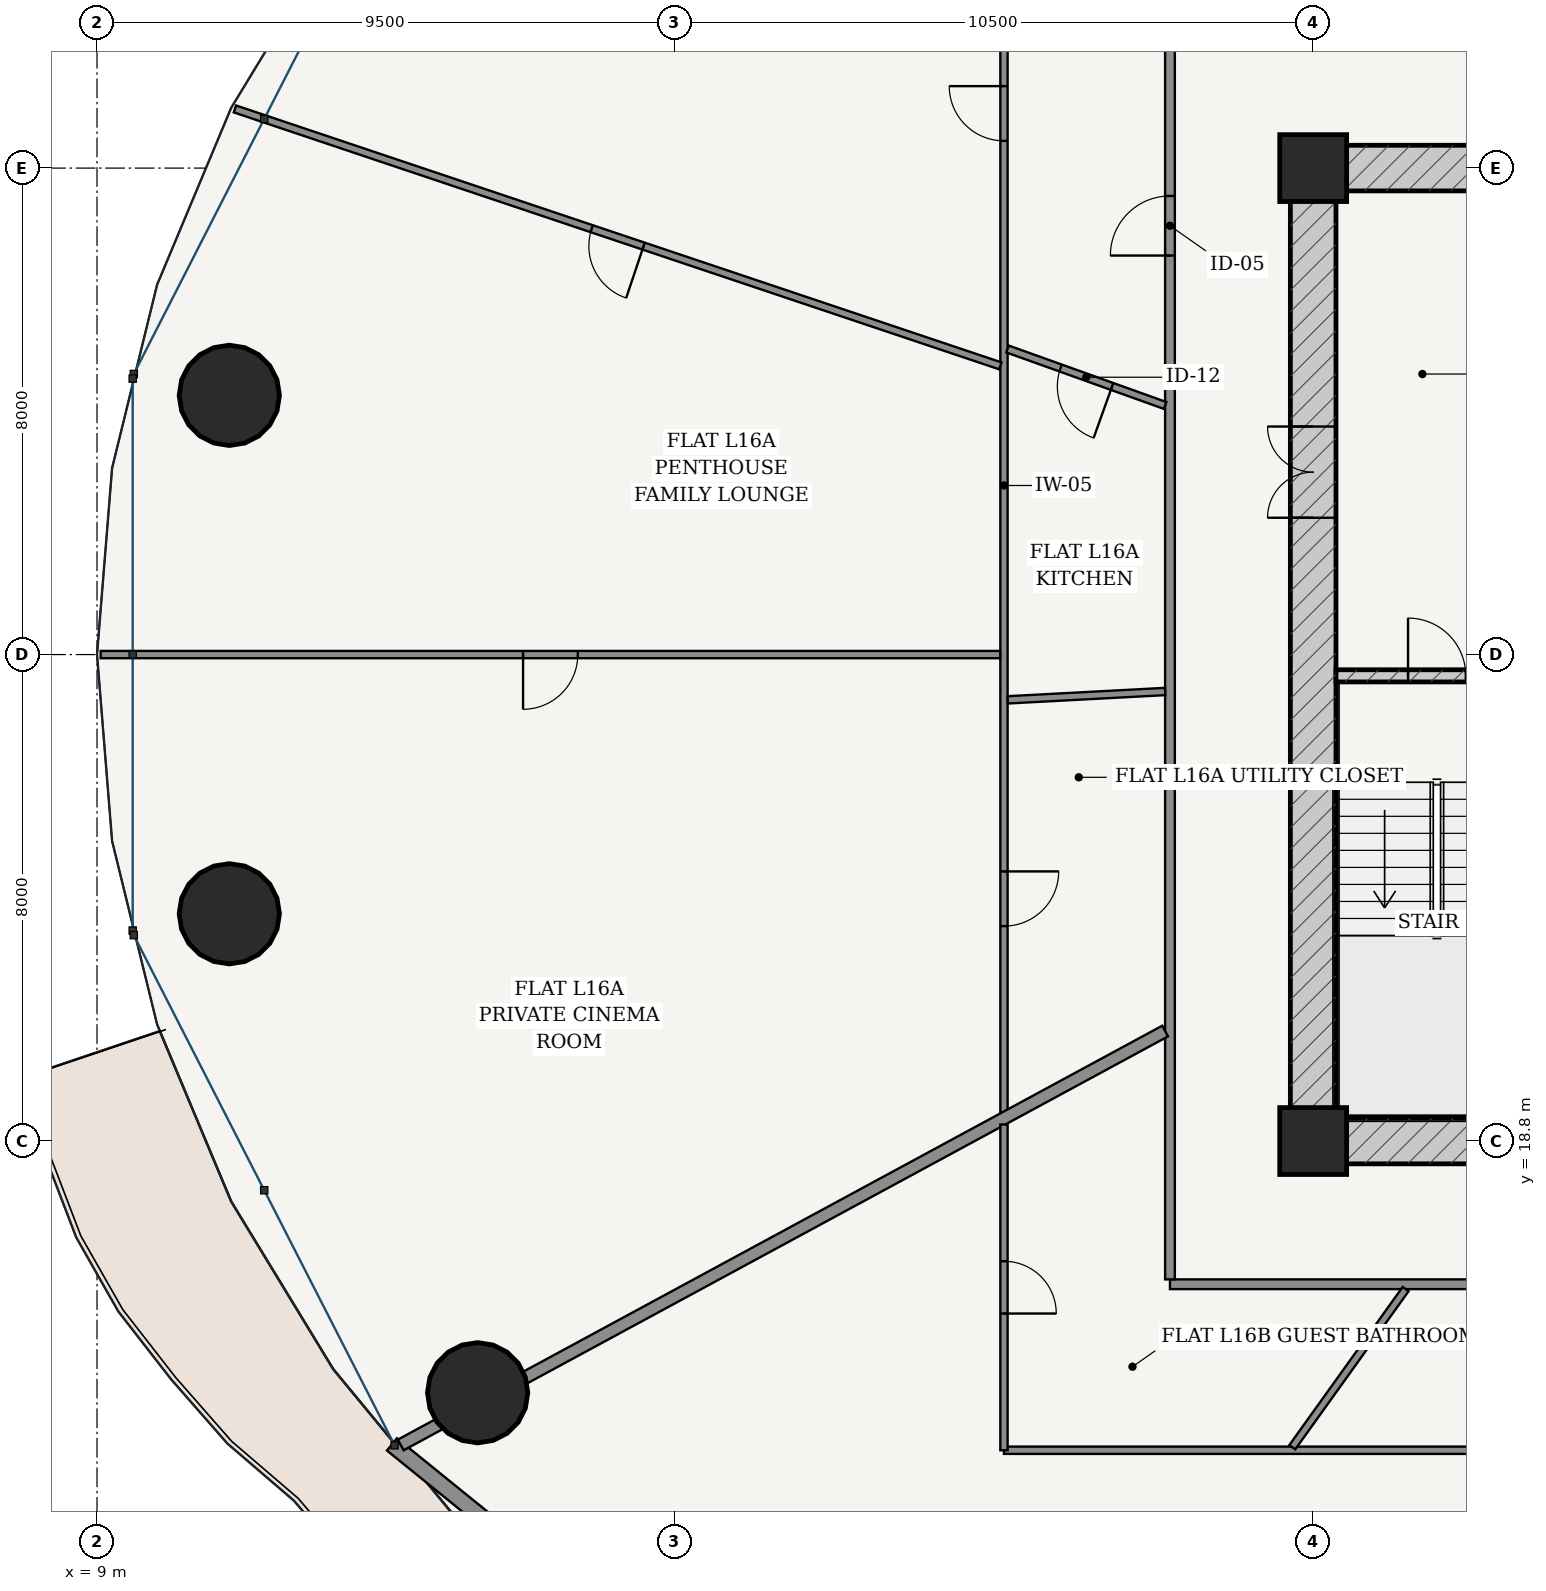
"""IFC4 building model, lengths in metres.
Left out: names, types, materials, properties, quantities, classifications, styles, units other than length and angle.
Written with IfcOpenShell. Run it as: python <this file> out.ifc"""

import sys

from ifc_helpers import new_model, si_unit, direction, frame, frame_2d, origin, origin_2d, place, context, subcontext, project, spatial, rectangle, hollow_circle, extrude, source, transform, mapped, element, fill, save


model = new_model("IFC4")
c1 = context("Model", 3, precision=1e-05, world=origin(), true_north=direction((-0.2419218956, 0.970295726276)))
c2 = subcontext(c1, "Body", "Model", "MODEL_VIEW")
j1 = project(units=[si_unit("LENGTHUNIT", "METRE"), si_unit("PLANEANGLEUNIT", "RADIAN")], contexts=[c1])
p1 = place(None, origin())
s1 = spatial("IfcSite", under=j1, at=p1, CompositionType="ELEMENT")
p2 = place(p1, origin())
s2 = spatial("IfcBuilding", under=s1, at=p2, CompositionType="ELEMENT")
p3 = place(p2, frame((0.0, 0.0, 63.6)))
s3 = spatial("IfcBuildingStorey", under=s2, at=p3, CompositionType="ELEMENT", Elevation=63.6)
for number, where, z_axis, x_axis in (
    (1, (29.0, 18.8, 0.0), (0.0, 0.0, 1.0), (1.0, 0.0, 0.0)),
    (2, (29.0, 34.8, 0.0), (0.0, 0.0, 1.0), (1.0, 0.0, 0.0)),
):
    element("IfcColumn", number, at=place(p3, frame(where, z_axis=z_axis, x_axis=x_axis)), inside=s3, PredefinedType="COLUMN", context=c2, shape_type="SweptSolid", body=[
        extrude(rectangle(XDim=1.1, YDim=1.1, at=origin_2d()), origin(), (0.0, 0.0, 1.0), 3.6),
    ])
p4 = place(p3, frame((28.625, 18.8, 0.0), z_axis=(0.0, 0.0, 1.0), x_axis=(1.0, 0.0, 0.0)))
e3 = element("IfcWall", 3, at=p4, inside=s3, PredefinedType="SHEAR", context=c2, shape_type="SweptSolid", body=[
    extrude(rectangle(XDim=18.75, YDim=0.75, at=frame_2d((9.375, 0.0))), origin(), (0.0, 0.0, 1.0), 3.32),
])
p5 = place(p4, frame((8.95, 0.0, 0.0)))
e4 = element("IfcOpeningElement", 4, at=p5, cuts=e3, PredefinedType="OPENING", context=c2, shape_type="SweptSolid", body=[
    extrude(rectangle(XDim=0.85, YDim=2.1, at=frame_2d((0.425, 1.05))), frame((0.0, 0.385, 0.0), z_axis=(0.0, -1.0, 0.0), x_axis=(1.0, 0.0, 0.0)), (0.0, 0.0, 1.0), 0.77),
])
p6 = place(p3, frame((28.625, 34.8, 0.0), z_axis=(0.0, 0.0, 1.0), x_axis=(1.0, 0.0, 0.0)))
e5 = element("IfcWall", 5, at=p6, inside=s3, PredefinedType="SHEAR", context=c2, shape_type="SweptSolid", body=[
    extrude(rectangle(XDim=18.75, YDim=0.75, at=frame_2d((9.375, 0.0))), origin(), (0.0, 0.0, 1.0), 3.32),
])
p7 = place(p6, frame((8.95, 0.0, 0.0)))
e6 = element("IfcOpeningElement", 6, at=p7, cuts=e5, PredefinedType="OPENING", context=c2, shape_type="SweptSolid", body=[
    extrude(rectangle(XDim=0.85, YDim=2.1, at=frame_2d((0.425, 1.05))), frame((0.0, 0.385, 0.0), z_axis=(0.0, -1.0, 0.0), x_axis=(1.0, 0.0, 0.0)), (0.0, 0.0, 1.0), 0.77),
])
p8 = place(p3, frame((29.0, 19.175, 0.0), z_axis=(0.0, 0.0, 1.0), x_axis=(0.0, 1.0, 0.0)))
e7 = element("IfcWall", 7, at=p8, inside=s3, PredefinedType="SHEAR", context=c2, shape_type="SweptSolid", body=[
    extrude(rectangle(XDim=15.25, YDim=0.75, at=frame_2d((7.625, 0.0))), origin(), (0.0, 0.0, 1.0), 3.32),
])
p9 = place(p8, frame((9.875, 0.0, 0.0)))
e8 = element("IfcOpeningElement", 8, at=p9, cuts=e7, PredefinedType="OPENING", context=c2, shape_type="SweptSolid", body=[
    extrude(rectangle(XDim=1.5, YDim=2.2, at=frame_2d((0.75, 1.1))), frame((0.0, 0.385, 0.0), z_axis=(0.0, -1.0, 0.0), x_axis=(1.0, 0.0, 0.0)), (0.0, 0.0, 1.0), 0.77),
])
p10 = place(p3, frame((29.375, 26.45, 0.0), z_axis=(0.0, 0.0, 1.0), x_axis=(1.0, 0.0, 0.0)))
e9 = element("IfcWall", 9, at=p10, inside=s3, PredefinedType="SOLIDWALL", context=c2, shape_type="SweptSolid", body=[
    extrude(rectangle(XDim=3.32, YDim=0.2, at=frame_2d((1.66, 0.0))), origin(), (0.0, 0.0, 1.0), 3.32),
])
p11 = place(p10, frame((1.185, 0.0, 0.0)))
e10 = element("IfcOpeningElement", 10, at=p11, cuts=e9, PredefinedType="OPENING", context=c2, shape_type="SweptSolid", body=[
    extrude(rectangle(XDim=0.95, YDim=2.15, at=frame_2d((0.475, 1.075))), frame((0.0, 0.11, 0.0), z_axis=(0.0, -1.0, 0.0), x_axis=(1.0, 0.0, 0.0)), (0.0, 0.0, 1.0), 0.22),
])
for number, where, z_axis, x_axis in (
    (11, (11.176, 31.063, 0.0), (0.0, 0.0, 1.0), (1.0, 0.0, 0.0)),
    (12, (11.176, 22.537, 0.0), (0.0, 0.0, 1.0), (1.0, 0.0, 0.0)),
    (13, (15.259, 14.661, 0.0), (0.0, 0.0, 1.0), (1.0, 0.0, 0.0)),
):
    element("IfcColumn", number, at=place(p3, frame(where, z_axis=z_axis, x_axis=x_axis)), inside=s3, PredefinedType="COLUMN", context=c2, shape_type="SweptSolid", body=[
        extrude(hollow_circle(Radius=0.825, WallThickness=0.05, at=origin_2d()), origin(), (0.0, 0.0, 1.0), 3.6),
    ])
p12 = place(p3, frame((13.85, 13.811, 0.0), z_axis=(0.0, 0.0, 1.0), x_axis=(0.777016782851, -0.629479879875, 0.0)))
e14 = element("IfcWall", 14, at=p12, inside=s3, PredefinedType="SOLIDWALL", context=c2, shape_type="SweptSolid", body=[
    extrude(rectangle(XDim=10.447, YDim=0.26, at=frame_2d((5.223, 0.0))), origin(), (0.0, 0.0, 1.0), 3.32),
])
p13 = place(p12, frame((4.548, 0.0, 0.0)))
e15 = element("IfcOpeningElement", 15, at=p13, cuts=e14, PredefinedType="OPENING", context=c2, shape_type="SweptSolid", body=[
    extrude(rectangle(XDim=1.35, YDim=2.2, at=frame_2d((0.675, 1.1))), frame((0.0, 0.14, 0.0), z_axis=(0.0, -1.0, 0.0), x_axis=(1.0, 0.0, 0.0)), (0.0, 0.0, 1.0), 0.28),
])
p14 = place(p3, frame((26.645, 16.445, 0.0), z_axis=(0.0, 0.0, 1.0), x_axis=(1.0, 0.0, 0.0)))
e16 = element("IfcWall", 16, at=p14, inside=s3, PredefinedType="PARTITIONING", context=c2, shape_type="SweptSolid", body=[
    extrude(rectangle(XDim=22.71, YDim=0.16, at=frame_2d((11.355, 0.0))), origin(), (0.0, 0.0, 1.0), 2.688),
])
p15 = place(p3, frame((26.645, 16.525, 0.0), z_axis=(0.0, 0.0, 1.0), x_axis=(0.0, 1.0, 0.0)))
e17 = element("IfcWall", 17, at=p15, inside=s3, PredefinedType="PARTITIONING", context=c2, shape_type="SweptSolid", body=[
    extrude(rectangle(XDim=20.55, YDim=0.16, at=frame_2d((10.275, 0.0))), origin(), (0.0, 0.0, 1.0), 2.688),
])
p16 = place(p15, frame((16.837, 0.0, 0.0)))
e18 = element("IfcOpeningElement", 18, at=p16, cuts=e17, PredefinedType="OPENING", context=c2, shape_type="SweptSolid", body=[
    extrude(rectangle(XDim=0.98, YDim=2.2, at=frame_2d((0.49, 1.1))), frame((0.0, 0.09, 0.0), z_axis=(0.0, -1.0, 0.0), x_axis=(1.0, 0.0, 0.0)), (0.0, 0.0, 1.0), 0.18),
])
p17 = place(p3, frame((23.915, 19.276, 0.0), z_axis=(0.0, 0.0, 1.0), x_axis=(0.0, 1.0, 0.0)))
e19 = element("IfcWall", 19, at=p17, inside=s3, PredefinedType="PARTITIONING", context=c2, shape_type="SweptSolid", body=[
    extrude(rectangle(XDim=20.609, YDim=0.12, at=frame_2d((10.305, 0.0))), origin(), (0.0, 0.0, 1.0), 2.688),
])
p18 = place(p17, frame((15.972, 0.0, 0.0)))
e20 = element("IfcOpeningElement", 20, at=p18, cuts=e19, PredefinedType="OPENING", context=c2, shape_type="SweptSolid", body=[
    extrude(rectangle(XDim=0.9, YDim=2.15, at=frame_2d((0.45, 1.075))), frame((0.0, 0.07, 0.0), z_axis=(0.0, -1.0, 0.0), x_axis=(1.0, 0.0, 0.0)), (0.0, 0.0, 1.0), 0.14),
])
p19 = place(p17, frame((3.058, 0.0, 0.0)))
e21 = element("IfcOpeningElement", 21, at=p19, cuts=e19, PredefinedType="OPENING", context=c2, shape_type="SweptSolid", body=[
    extrude(rectangle(XDim=0.9, YDim=2.15, at=frame_2d((0.45, 1.075))), frame((0.0, 0.07, 0.0), z_axis=(0.0, -1.0, 0.0), x_axis=(1.0, 0.0, 0.0)), (0.0, 0.0, 1.0), 0.14),
])
p20 = place(p3, frame((23.856, 31.547, 0.0), z_axis=(0.0, 0.0, 1.0), x_axis=(-0.948017487737, 0.318218231634, 0.0)))
e22 = element("IfcWall", 22, at=p20, inside=s3, PredefinedType="PARTITIONING", context=c2, shape_type="SweptSolid", body=[
    extrude(rectangle(XDim=13.279, YDim=0.12, at=frame_2d((6.639, 0.0))), origin(), (0.0, 0.0, 1.0), 2.762),
])
p21 = place(p20, frame((6.189, 0.0, 0.0)))
e23 = element("IfcOpeningElement", 23, at=p21, cuts=e22, PredefinedType="OPENING", context=c2, shape_type="SweptSolid", body=[
    extrude(rectangle(XDim=0.9, YDim=2.15, at=frame_2d((0.45, 1.075))), frame((0.0, 0.07, 0.0), z_axis=(0.0, -1.0, 0.0), x_axis=(1.0, 0.0, 0.0)), (0.0, 0.0, 1.0), 0.14),
])
p22 = place(p3, frame((23.853, 26.8, 0.0), z_axis=(0.0, 0.0, 1.0), x_axis=(-1.0, 0.0, 0.0)))
e24 = element("IfcWall", 24, at=p22, inside=s3, PredefinedType="PARTITIONING", context=c2, shape_type="SweptSolid", body=[
    extrude(rectangle(XDim=14.793, YDim=0.12, at=frame_2d((7.396, 0.0))), origin(), (0.0, 0.0, 1.0), 2.762),
])
p23 = place(p22, frame((6.947, 0.0, 0.0)))
e25 = element("IfcOpeningElement", 25, at=p23, cuts=e24, PredefinedType="OPENING", context=c2, shape_type="SweptSolid", body=[
    extrude(rectangle(XDim=0.9, YDim=2.15, at=frame_2d((0.45, 1.075))), frame((0.0, 0.07, 0.0), z_axis=(0.0, -1.0, 0.0), x_axis=(1.0, 0.0, 0.0)), (0.0, 0.0, 1.0), 0.14),
])
p24 = place(p3, frame((26.565, 30.896, 0.0), z_axis=(0.0, 0.0, 1.0), x_axis=(-0.941406362049, 0.337274460186, 0.0)))
e26 = element("IfcWall", 26, at=p24, inside=s3, PredefinedType="PARTITIONING", context=c2, shape_type="SweptSolid", body=[
    extrude(rectangle(XDim=2.753, YDim=0.12, at=frame_2d((1.376, 0.0))), origin(), (0.0, 0.0, 1.0), 3.32),
])
p25 = place(p24, frame((0.927, 0.0, 0.0)))
e27 = element("IfcOpeningElement", 27, at=p25, cuts=e26, PredefinedType="OPENING", context=c2, shape_type="SweptSolid", body=[
    extrude(rectangle(XDim=0.9, YDim=2.15, at=frame_2d((0.45, 1.075))), frame((0.0, 0.07, 0.0), z_axis=(0.0, -1.0, 0.0), x_axis=(1.0, 0.0, 0.0)), (0.0, 0.0, 1.0), 0.14),
])
p26 = place(p3, frame((26.565, 26.193, 0.0), z_axis=(0.0, 0.0, 1.0), x_axis=(-0.99859273586, -0.053033460078, 0.0)))
e28 = element("IfcWall", 28, at=p26, inside=s3, PredefinedType="PARTITIONING", context=c2, shape_type="SweptSolid", body=[
    extrude(rectangle(XDim=2.592, YDim=0.12, at=frame_2d((1.296, 0.0))), origin(), (0.0, 0.0, 1.0), 3.32),
])
p27 = place(p3, frame((26.565, 20.608, 0.0), z_axis=(0.0, 0.0, 1.0), x_axis=(-0.879369737803, -0.476139542819, 0.0)))
e29 = element("IfcWall", 29, at=p27, inside=s3, PredefinedType="PARTITIONING", context=c2, shape_type="SweptSolid", body=[
    extrude(rectangle(XDim=14.295, YDim=0.2, at=frame_2d((7.147, 0.0))), origin(), (0.0, 0.0, 1.0), 2.688),
])
p28 = place(p3, frame((52.085, 13.715, 0.0), z_axis=(0.0, 0.0, 1.0), x_axis=(-1.0, 0.0, 0.0)))
e30 = element("IfcWall", 30, at=p28, inside=s3, PredefinedType="PARTITIONING", context=c2, shape_type="SweptSolid", body=[
    extrude(rectangle(XDim=28.17, YDim=0.12, at=frame_2d((14.085, 0.0))), origin(), (0.0, 0.0, 1.0), 2.688),
])
p29 = place(p28, frame((12.891, 0.0, 0.0)))
e31 = element("IfcOpeningElement", 31, at=p29, cuts=e30, PredefinedType="OPENING", context=c2, shape_type="SweptSolid", body=[
    extrude(rectangle(XDim=0.9, YDim=2.15, at=frame_2d((0.45, 1.075))), frame((0.0, 0.07, 0.0), z_axis=(0.0, -1.0, 0.0), x_axis=(1.0, 0.0, 0.0)), (0.0, 0.0, 1.0), 0.14),
])
p30 = place(p3, frame((23.915, 13.715, 0.0), z_axis=(0.0, 0.0, 1.0), x_axis=(0.0, 1.0, 0.0)))
e32 = element("IfcWall", 32, at=p30, inside=s3, PredefinedType="PARTITIONING", context=c2, shape_type="SweptSolid", body=[
    extrude(rectangle(XDim=5.356, YDim=0.12, at=frame_2d((2.678, 0.0))), origin(), (0.0, 0.0, 1.0), 2.999),
])
p31 = place(p30, frame((2.248, 0.0, 0.0)))
e33 = element("IfcOpeningElement", 33, at=p31, cuts=e32, PredefinedType="OPENING", context=c2, shape_type="SweptSolid", body=[
    extrude(rectangle(XDim=0.86, YDim=2.15, at=frame_2d((0.43, 1.075))), frame((0.0, 0.07, 0.0), z_axis=(0.0, -1.0, 0.0), x_axis=(1.0, 0.0, 0.0)), (0.0, 0.0, 1.0), 0.14),
])
p32 = place(p3, frame((30.52, 16.365, 0.0), z_axis=(0.0, 0.0, 1.0), x_axis=(-0.582566008831, -0.812783393872, 0.0)))
e34 = element("IfcWall", 34, at=p32, inside=s3, PredefinedType="PARTITIONING", context=c2, shape_type="SweptSolid", body=[
    extrude(rectangle(XDim=3.198, YDim=0.12, at=frame_2d((1.599, 0.0))), origin(), (0.0, 0.0, 1.0), 3.32),
])
m1 = source(origin(), c2, "Body", "SweptSolid", [
    extrude(rectangle(XDim=1.5, YDim=2.2, at=frame_2d((0.75, 1.1))), frame((0.0, 0.025, 0.0), z_axis=(0.0, -1.0, 0.0), x_axis=(1.0, 0.0, 0.0)), (0.0, 0.0, 1.0), 0.05),
])
p33 = place(p9, origin())
e35 = element("IfcDoor", 35, at=p33, inside=s3, OperationType="DOUBLE_DOOR_SINGLE_SWING", PredefinedType="DOOR", context=c2, shape_type="MappedRepresentation", body=[
    mapped(m1, transform((0.0, 0.0, 0.0), scale=1.0)),
])
fill(e8, e35)
m2 = source(origin(), c2, "Body", "SweptSolid", [
    extrude(rectangle(XDim=0.95, YDim=2.15, at=frame_2d((0.475, 1.075))), frame((0.0, 0.025, 0.0), z_axis=(0.0, -1.0, 0.0), x_axis=(1.0, 0.0, 0.0)), (0.0, 0.0, 1.0), 0.05),
])
p34 = place(p11, origin())
e36 = element("IfcDoor", 36, at=p34, inside=s3, OperationType="SINGLE_SWING_LEFT", PredefinedType="DOOR", context=c2, shape_type="MappedRepresentation", body=[
    mapped(m2, transform((0.0, 0.0, 0.0), scale=1.0)),
])
fill(e10, e36)
m3 = source(origin(), c2, "Body", "SweptSolid", [
    extrude(rectangle(XDim=0.98, YDim=2.2, at=frame_2d((0.49, 1.1))), frame((0.0, 0.025, 0.0), z_axis=(0.0, -1.0, 0.0), x_axis=(1.0, 0.0, 0.0)), (0.0, 0.0, 1.0), 0.05),
])
p35 = place(p16, origin())
e37 = element("IfcDoor", 37, at=p35, inside=s3, OperationType="SINGLE_SWING_LEFT", PredefinedType="DOOR", context=c2, shape_type="MappedRepresentation", body=[
    mapped(m3, transform((0.0, 0.0, 0.0), scale=1.0)),
])
fill(e18, e37)
m4 = source(origin(), c2, "Body", "SweptSolid", [
    extrude(rectangle(XDim=0.9, YDim=2.15, at=frame_2d((0.45, 1.075))), frame((0.0, 0.025, 0.0), z_axis=(0.0, -1.0, 0.0), x_axis=(1.0, 0.0, 0.0)), (0.0, 0.0, 1.0), 0.05),
])
p36 = place(p25, origin())
e38 = element("IfcDoor", 38, at=p36, inside=s3, OperationType="SINGLE_SWING_LEFT", PredefinedType="DOOR", context=c2, shape_type="MappedRepresentation", body=[
    mapped(m4, transform((0.0, 0.0, 0.0), scale=1.0)),
])
fill(e27, e38)
p37 = place(p18, origin())
e39 = element("IfcDoor", 39, at=p37, inside=s3, OperationType="SINGLE_SWING_RIGHT", PredefinedType="DOOR", context=c2, shape_type="MappedRepresentation", body=[
    mapped(m4, transform((0.0, 0.0, 0.0), scale=1.0)),
])
fill(e20, e39)
p38 = place(p21, origin())
e40 = element("IfcDoor", 40, at=p38, inside=s3, OperationType="SINGLE_SWING_LEFT", PredefinedType="DOOR", context=c2, shape_type="MappedRepresentation", body=[
    mapped(m4, transform((0.0, 0.0, 0.0), scale=1.0)),
])
fill(e23, e40)
p39 = place(p23, origin())
e41 = element("IfcDoor", 41, at=p39, inside=s3, OperationType="SINGLE_SWING_RIGHT", PredefinedType="DOOR", context=c2, shape_type="MappedRepresentation", body=[
    mapped(m4, transform((0.0, 0.0, 0.0), scale=1.0)),
])
fill(e25, e41)
p40 = place(p19, frame((0.9, 0.0, 0.0), z_axis=(0.0, 0.0, 1.0), x_axis=(-1.0, 0.0, 0.0)))
e42 = element("IfcDoor", 42, at=p40, inside=s3, OperationType="SINGLE_SWING_LEFT", PredefinedType="DOOR", context=c2, shape_type="MappedRepresentation", body=[
    mapped(m4, transform((0.0, 0.0, 0.0), scale=1.0)),
])
fill(e21, e42)
m5 = source(origin(), c2, "Body", "SweptSolid", [
    extrude(rectangle(XDim=0.86, YDim=2.15, at=frame_2d((0.43, 1.075))), frame((0.0, 0.025, 0.0), z_axis=(0.0, -1.0, 0.0), x_axis=(1.0, 0.0, 0.0)), (0.0, 0.0, 1.0), 0.05),
])
p41 = place(p31, frame((0.86, 0.0, 0.0), z_axis=(0.0, 0.0, 1.0), x_axis=(-1.0, 0.0, 0.0)))
e43 = element("IfcDoor", 43, at=p41, inside=s3, OperationType="SINGLE_SWING_RIGHT", PredefinedType="DOOR", context=c2, shape_type="MappedRepresentation", body=[
    mapped(m5, transform((0.0, 0.0, 0.0), scale=1.0)),
])
fill(e33, e43)
save(model, sys.argv[1])
